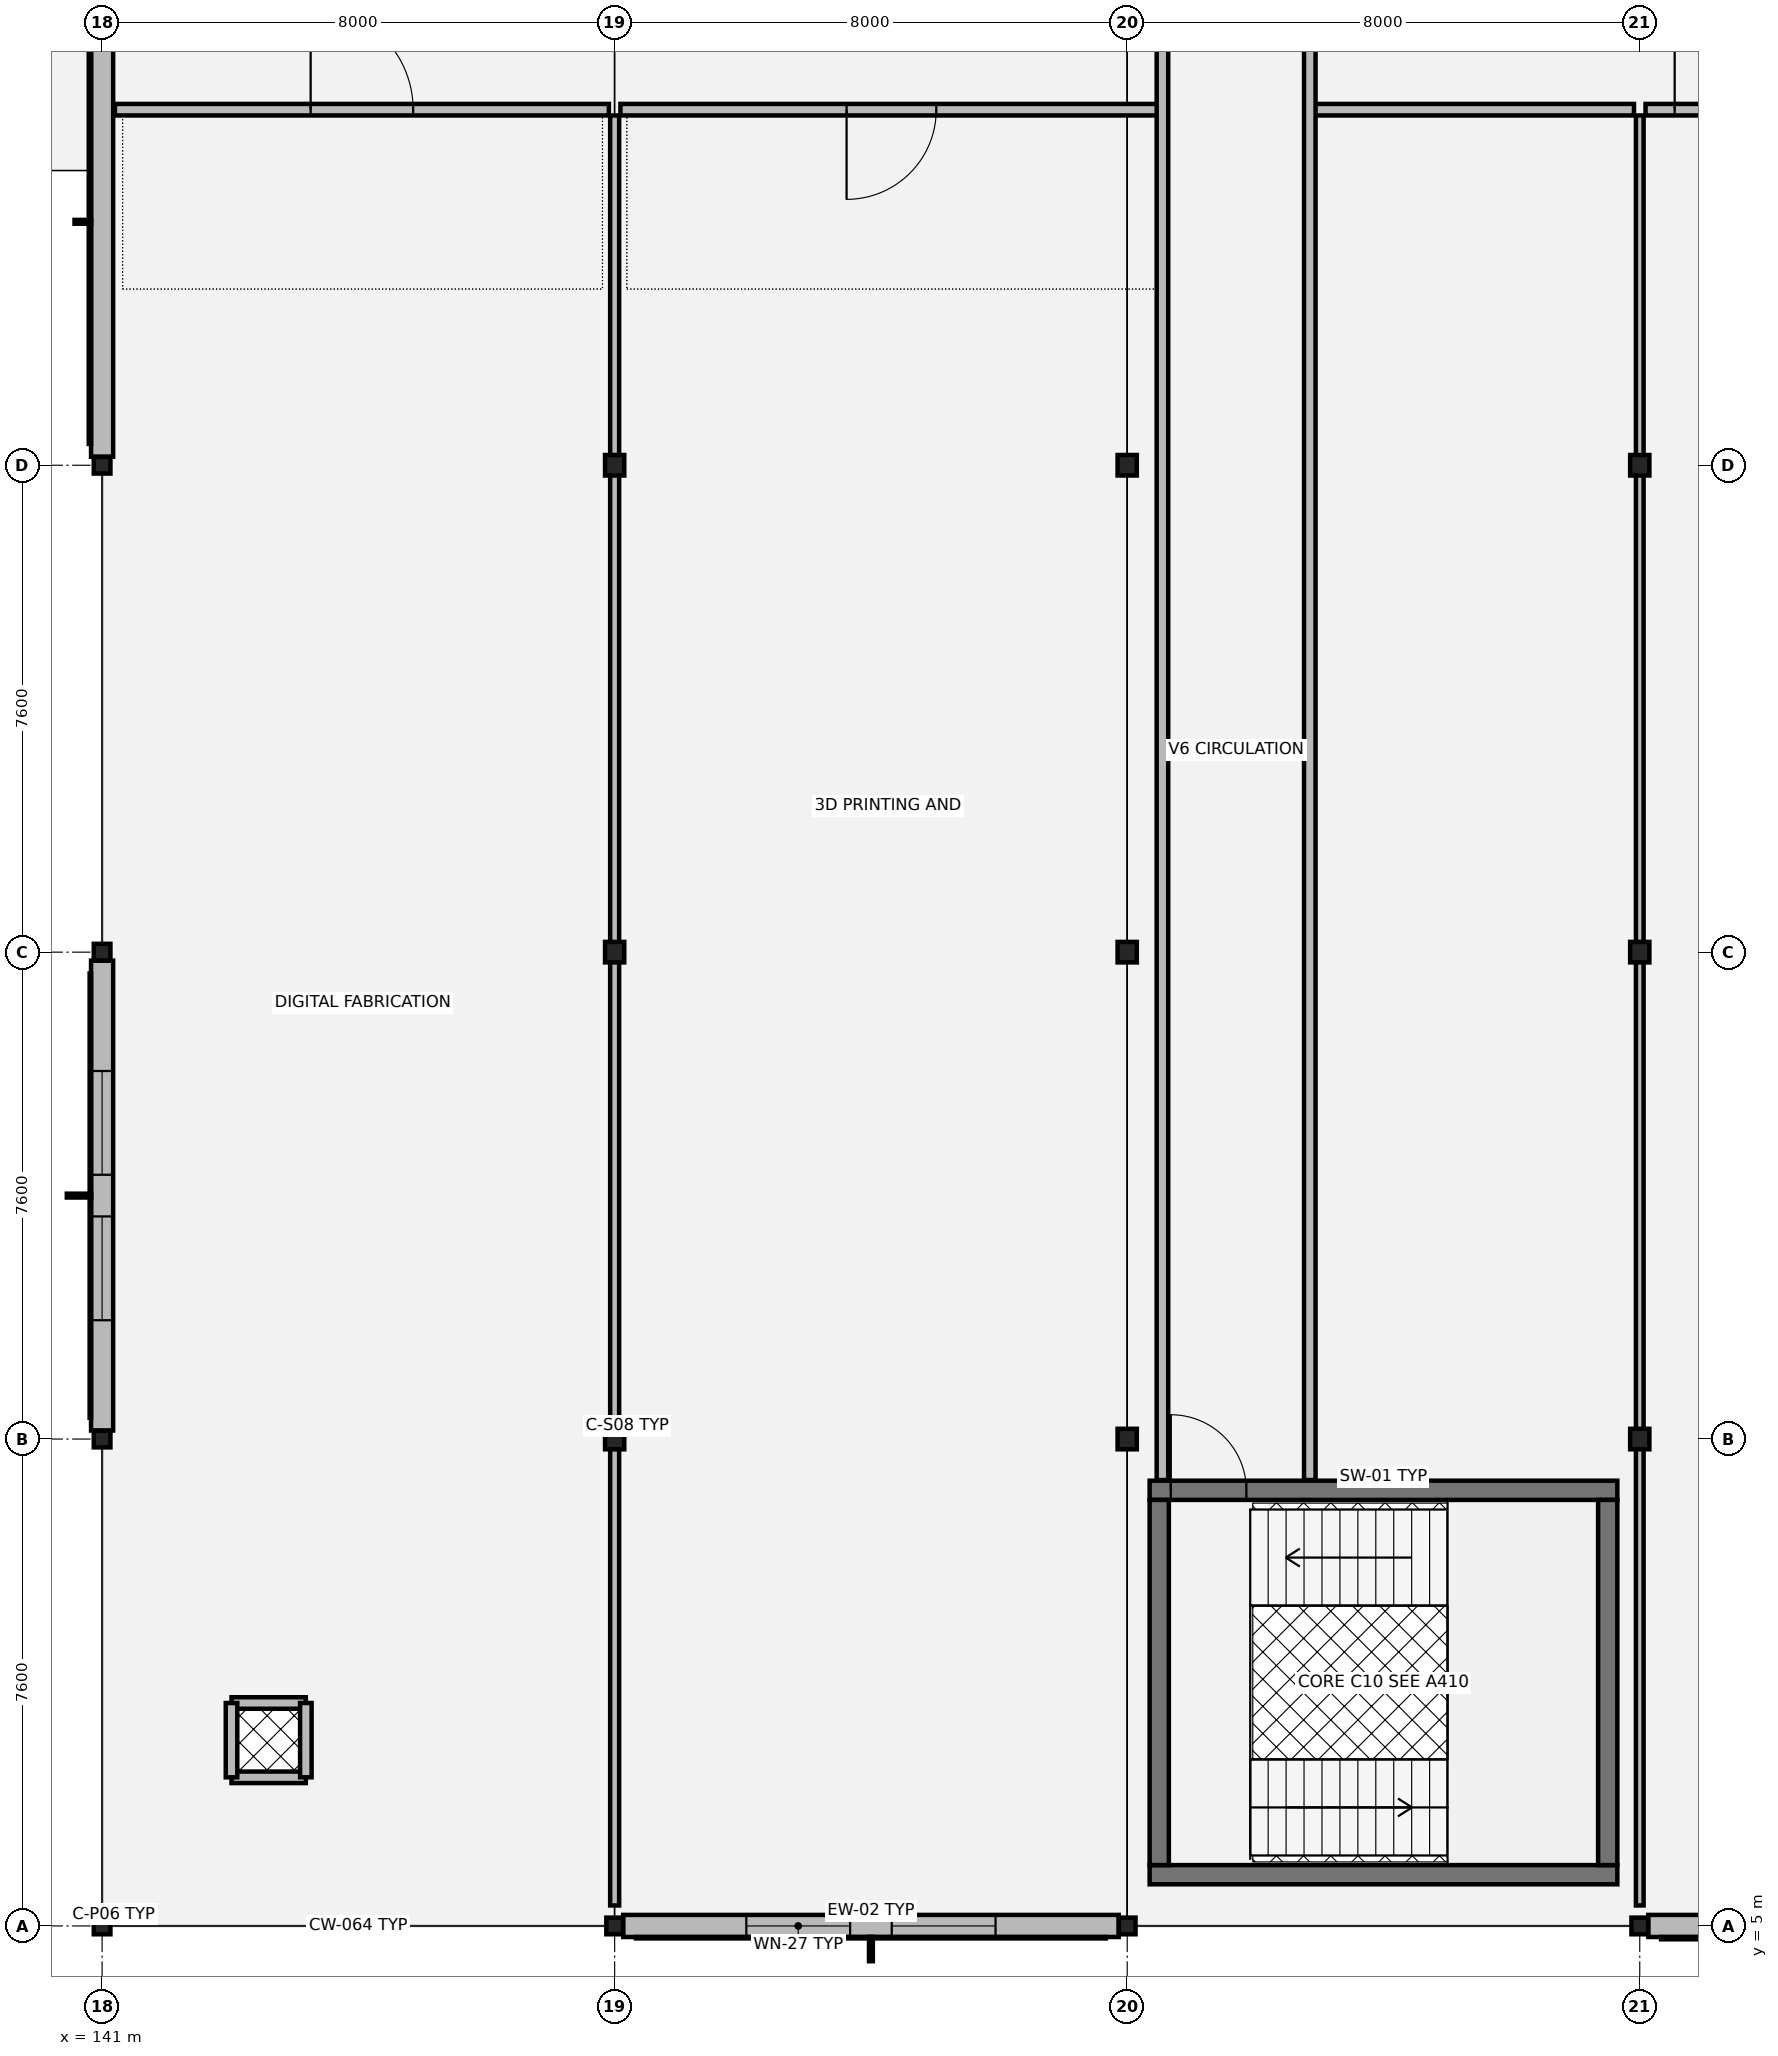
"""IFC4 building model, lengths in metres.
Left out: names, types, materials, properties, quantities, classifications, styles, units other than length and angle.
Written with IfcOpenShell. Run it as: python <this file> out.ifc"""

import sys

from ifc_helpers import new_model, si_unit, direction, frame, frame_2d, origin, origin_2d, place, context, subcontext, project, spatial, rectangle, hollow_rectangle, i_section, extrude, element, fill, save


model = new_model("IFC4")
c1 = context("Model", 3, precision=1e-05, world=origin(), true_north=direction((0.0, 1.0)))
c2 = subcontext(c1, "Body", "Model", "MODEL_VIEW")
j1 = project(units=[si_unit("LENGTHUNIT", "METRE"), si_unit("PLANEANGLEUNIT", "RADIAN")], contexts=[c1])
p1 = place(None, origin())
s1 = spatial("IfcSite", under=j1, at=p1, CompositionType="ELEMENT")
p2 = place(p1, origin())
s2 = spatial("IfcBuilding", under=s1, at=p2, CompositionType="ELEMENT")
p3 = place(p2, frame((0.0, 0.0, 9.18)))
s3 = spatial("IfcBuildingStorey", under=s2, at=p3, CompositionType="ELEMENT", Elevation=9.18)
for number, where, z_axis, x_axis in (
    (1, (141.0, 5.0, 0.0), (0.0, 0.0, 1.0), (1.0, 0.0, 0.0)),
    (2, (141.0, 12.6, 0.0), (0.0, 0.0, 1.0), (1.0, 0.0, 0.0)),
    (3, (141.0, 20.2, 0.0), (0.0, 0.0, 1.0), (1.0, 0.0, 0.0)),
    (4, (141.0, 27.8, 0.0), (0.0, 0.0, 1.0), (1.0, 0.0, 0.0)),
    (5, (149.0, 5.0, 0.0), (0.0, 0.0, 1.0), (1.0, 0.0, 0.0)),
):
    element("IfcColumn", number, at=place(p3, frame(where, z_axis=z_axis, x_axis=x_axis)), inside=s3, PredefinedType="COLUMN", context=c2, shape_type="SweptSolid", body=[
        extrude(hollow_rectangle(XDim=0.26, YDim=0.26, WallThickness=0.012, at=origin_2d()), origin(), (0.0, 0.0, 1.0), 4.055),
    ])
for number, where, z_axis, x_axis in (
    (6, (149.0, 12.6, 0.0), (0.0, 0.0, 1.0), (1.0, 0.0, 0.0)),
    (7, (149.0, 20.2, 0.0), (0.0, 0.0, 1.0), (1.0, 0.0, 0.0)),
    (8, (149.0, 27.8, 0.0), (0.0, 0.0, 1.0), (1.0, 0.0, 0.0)),
):
    element("IfcColumn", number, at=place(p3, frame(where, z_axis=z_axis, x_axis=x_axis)), inside=s3, PredefinedType="COLUMN", context=c2, shape_type="SweptSolid", body=[
        extrude(i_section(OverallWidth=0.3, OverallDepth=0.32, WebThickness=0.011, FlangeThickness=0.021, at=origin_2d()), origin(), (0.0, 0.0, 1.0), 4.055),
    ])
p4 = place(p3, frame((157.0, 5.0, 0.0), z_axis=(0.0, 0.0, 1.0), x_axis=(1.0, 0.0, 0.0)))
e9 = element("IfcColumn", 9, at=p4, inside=s3, PredefinedType="COLUMN", context=c2, shape_type="SweptSolid", body=[
    extrude(hollow_rectangle(XDim=0.26, YDim=0.26, WallThickness=0.012, at=origin_2d()), origin(), (0.0, 0.0, 1.0), 4.055),
])
for number, where, z_axis, x_axis in (
    (10, (157.0, 12.6, 0.0), (0.0, 0.0, 1.0), (1.0, 0.0, 0.0)),
    (11, (157.0, 20.2, 0.0), (0.0, 0.0, 1.0), (1.0, 0.0, 0.0)),
    (12, (157.0, 27.8, 0.0), (0.0, 0.0, 1.0), (1.0, 0.0, 0.0)),
):
    element("IfcColumn", number, at=place(p3, frame(where, z_axis=z_axis, x_axis=x_axis)), inside=s3, PredefinedType="COLUMN", context=c2, shape_type="SweptSolid", body=[
        extrude(i_section(OverallWidth=0.3, OverallDepth=0.32, WebThickness=0.011, FlangeThickness=0.021, at=origin_2d()), origin(), (0.0, 0.0, 1.0), 4.055),
    ])
p5 = place(p3, frame((165.0, 5.0, 0.0), z_axis=(0.0, 0.0, 1.0), x_axis=(1.0, 0.0, 0.0)))
e13 = element("IfcColumn", 13, at=p5, inside=s3, PredefinedType="COLUMN", context=c2, shape_type="SweptSolid", body=[
    extrude(hollow_rectangle(XDim=0.26, YDim=0.26, WallThickness=0.012, at=origin_2d()), origin(), (0.0, 0.0, 1.0), 4.055),
])
for number, where, z_axis, x_axis in (
    (14, (165.0, 12.6, 0.0), (0.0, 0.0, 1.0), (1.0, 0.0, 0.0)),
    (15, (165.0, 20.2, 0.0), (0.0, 0.0, 1.0), (1.0, 0.0, 0.0)),
    (16, (165.0, 27.8, 0.0), (0.0, 0.0, 1.0), (1.0, 0.0, 0.0)),
):
    element("IfcColumn", number, at=place(p3, frame(where, z_axis=z_axis, x_axis=x_axis)), inside=s3, PredefinedType="COLUMN", context=c2, shape_type="SweptSolid", body=[
        extrude(i_section(OverallWidth=0.3, OverallDepth=0.32, WebThickness=0.011, FlangeThickness=0.021, at=origin_2d()), origin(), (0.0, 0.0, 1.0), 4.055),
    ])
p6 = place(p3, frame((149.133, 5.0, 0.0), z_axis=(0.0, 0.0, 1.0), x_axis=(1.0, 0.0, 0.0)))
e17 = element("IfcWall", 17, at=p6, inside=s3, PredefinedType="SOLIDWALL", context=c2, shape_type="SweptSolid", body=[
    extrude(rectangle(XDim=7.734, YDim=0.345, at=frame_2d((3.867, 0.0))), origin(), (0.0, 0.0, 1.0), 3.48),
])
p7 = place(p6, frame((1.922, 0.0, 0.8)))
e18 = element("IfcOpeningElement", 18, at=p7, cuts=e17, PredefinedType="OPENING", context=c2, shape_type="SweptSolid", body=[
    extrude(rectangle(XDim=1.62, YDim=2.06, at=frame_2d((0.81, 1.03))), frame((0.0, 0.182, 0.0), z_axis=(0.0, -1.0, 0.0), x_axis=(1.0, 0.0, 0.0)), (0.0, 0.0, 1.0), 0.365),
])
p8 = place(p6, frame((4.192, 0.0, 0.8)))
e19 = element("IfcOpeningElement", 19, at=p8, cuts=e17, PredefinedType="OPENING", context=c2, shape_type="SweptSolid", body=[
    extrude(rectangle(XDim=1.62, YDim=2.06, at=frame_2d((0.81, 1.03))), frame((0.0, 0.182, 0.0), z_axis=(0.0, -1.0, 0.0), x_axis=(1.0, 0.0, 0.0)), (0.0, 0.0, 1.0), 0.365),
])
p9 = place(p3, frame((165.133, 5.0, 0.0), z_axis=(0.0, 0.0, 1.0), x_axis=(1.0, 0.0, 0.0)))
e20 = element("IfcWall", 20, at=p9, inside=s3, PredefinedType="SOLIDWALL", context=c2, shape_type="SweptSolid", body=[
    extrude(rectangle(XDim=7.734, YDim=0.345, at=frame_2d((3.867, 0.0))), origin(), (0.0, 0.0, 1.0), 3.48),
])
p10 = place(p9, frame((1.842, 0.0, 0.8)))
e21 = element("IfcOpeningElement", 21, at=p10, cuts=e20, PredefinedType="OPENING", context=c2, shape_type="SweptSolid", body=[
    extrude(rectangle(XDim=1.7, YDim=2.2, at=frame_2d((0.85, 1.1))), frame((0.0, 0.182, 0.0), z_axis=(0.0, -1.0, 0.0), x_axis=(1.0, 0.0, 0.0)), (0.0, 0.0, 1.0), 0.365),
])
p11 = place(p9, frame((4.192, 0.0, 0.8)))
e22 = element("IfcOpeningElement", 22, at=p11, cuts=e20, PredefinedType="OPENING", context=c2, shape_type="SweptSolid", body=[
    extrude(rectangle(XDim=1.7, YDim=2.2, at=frame_2d((0.85, 1.1))), frame((0.0, 0.182, 0.0), z_axis=(0.0, -1.0, 0.0), x_axis=(1.0, 0.0, 0.0)), (0.0, 0.0, 1.0), 0.365),
])
p12 = place(p3, frame((141.0, 35.267, 0.0), z_axis=(0.0, 0.0, 1.0), x_axis=(0.0, -1.0, 0.0)))
e23 = element("IfcWall", 23, at=p12, inside=s3, PredefinedType="SOLIDWALL", context=c2, shape_type="SweptSolid", body=[
    extrude(rectangle(XDim=7.334, YDim=0.345, at=frame_2d((3.667, 0.0))), origin(), (0.0, 0.0, 1.0), 3.48),
])
p13 = place(p3, frame((141.0, 20.067, 0.0), z_axis=(0.0, 0.0, 1.0), x_axis=(0.0, -1.0, 0.0)))
e24 = element("IfcWall", 24, at=p13, inside=s3, PredefinedType="SOLIDWALL", context=c2, shape_type="SweptSolid", body=[
    extrude(rectangle(XDim=7.334, YDim=0.345, at=frame_2d((3.667, 0.0))), origin(), (0.0, 0.0, 1.0), 3.48),
])
p14 = place(p13, frame((1.722, 0.0, 0.8)))
e25 = element("IfcOpeningElement", 25, at=p14, cuts=e24, PredefinedType="OPENING", context=c2, shape_type="SweptSolid", body=[
    extrude(rectangle(XDim=1.62, YDim=2.06, at=frame_2d((0.81, 1.03))), frame((0.0, 0.182, 0.0), z_axis=(0.0, -1.0, 0.0), x_axis=(1.0, 0.0, 0.0)), (0.0, 0.0, 1.0), 0.365),
])
p15 = place(p13, frame((3.992, 0.0, 0.8)))
e26 = element("IfcOpeningElement", 26, at=p15, cuts=e24, PredefinedType="OPENING", context=c2, shape_type="SweptSolid", body=[
    extrude(rectangle(XDim=1.62, YDim=2.06, at=frame_2d((0.81, 1.03))), frame((0.0, 0.182, 0.0), z_axis=(0.0, -1.0, 0.0), x_axis=(1.0, 0.0, 0.0)), (0.0, 0.0, 1.0), 0.365),
])
p16 = place(p3, frame((157.35, 5.8, 0.0), z_axis=(0.0, 0.0, 1.0), x_axis=(1.0, 0.0, 0.0)))
e27 = element("IfcWall", 27, at=p16, inside=s3, PredefinedType="SHEAR", context=c2, shape_type="SweptSolid", body=[
    extrude(rectangle(XDim=7.3, YDim=0.3, at=frame_2d((3.65, 0.0))), origin(), (0.0, 0.0, 1.0), 3.845),
])
p17 = place(p3, frame((157.35, 11.8, 0.0), z_axis=(0.0, 0.0, 1.0), x_axis=(1.0, 0.0, 0.0)))
e28 = element("IfcWall", 28, at=p17, inside=s3, PredefinedType="SHEAR", context=c2, shape_type="SweptSolid", body=[
    extrude(rectangle(XDim=7.3, YDim=0.3, at=frame_2d((3.65, 0.0))), origin(), (0.0, 0.0, 1.0), 3.845),
])
p18 = place(p17, frame((0.33, 0.0, 0.0)))
e29 = element("IfcOpeningElement", 29, at=p18, cuts=e28, PredefinedType="OPENING", context=c2, shape_type="SweptSolid", body=[
    extrude(rectangle(XDim=1.18, YDim=2.18, at=frame_2d((0.59, 1.09))), frame((0.0, 0.16, 0.0), z_axis=(0.0, -1.0, 0.0), x_axis=(1.0, 0.0, 0.0)), (0.0, 0.0, 1.0), 0.32),
])
for number, where, z_axis, x_axis in (
    (30, (157.5, 5.95, 0.0), (0.0, 0.0, 1.0), (0.0, 1.0, 0.0)),
    (31, (164.5, 5.95, 0.0), (0.0, 0.0, 1.0), (0.0, 1.0, 0.0)),
):
    element("IfcWall", number, at=place(p3, frame(where, z_axis=z_axis, x_axis=x_axis)), inside=s3, PredefinedType="SHEAR", context=c2, shape_type="SweptSolid", body=[
        extrude(rectangle(XDim=5.7, YDim=0.3, at=frame_2d((2.85, 0.0))), origin(), (0.0, 0.0, 1.0), 3.845),
    ])
for number, where, z_axis, x_axis in (
    (32, (143.02, 7.32, 0.0), (0.0, 0.0, 1.0), (1.0, 0.0, 0.0)),
    (33, (144.18, 8.48, 0.0), (0.0, 0.0, 1.0), (-1.0, 0.0, 0.0)),
    (34, (143.02, 8.48, 0.0), (0.0, 0.0, 1.0), (0.0, -1.0, 0.0)),
    (35, (144.18, 7.32, 0.0), (0.0, 0.0, 1.0), (0.0, 1.0, 0.0)),
):
    element("IfcWall", number, at=place(p3, frame(where, z_axis=z_axis, x_axis=x_axis)), inside=s3, PredefinedType="PARTITIONING", context=c2, shape_type="SweptSolid", body=[
        extrude(rectangle(XDim=1.16, YDim=0.18, at=frame_2d((0.58, 0.0))), origin(), (0.0, 0.0, 1.0), 3.18),
    ])
p19 = place(p3, frame((141.2, 33.35, 0.0), z_axis=(0.0, 0.0, 1.0), x_axis=(1.0, 0.0, 0.0)))
e36 = element("IfcWall", 36, at=p19, inside=s3, PredefinedType="PARTITIONING", context=c2, shape_type="SweptSolid", body=[
    extrude(rectangle(XDim=7.71, YDim=0.18, at=frame_2d((3.855, 0.0))), origin(), (0.0, 0.0, 1.0), 3.18),
])
p20 = place(p19, frame((3.055, 0.0, 0.0)))
e37 = element("IfcOpeningElement", 37, at=p20, cuts=e36, PredefinedType="OPENING", context=c2, shape_type="SweptSolid", body=[
    extrude(rectangle(XDim=1.6, YDim=2.25, at=frame_2d((0.8, 1.125))), frame((0.0, 0.1, 0.0), z_axis=(0.0, -1.0, 0.0), x_axis=(1.0, 0.0, 0.0)), (0.0, 0.0, 1.0), 0.2),
])
p21 = place(p3, frame((149.09, 33.35, 0.0), z_axis=(0.0, 0.0, 1.0), x_axis=(1.0, 0.0, 0.0)))
e38 = element("IfcWall", 38, at=p21, inside=s3, PredefinedType="PARTITIONING", context=c2, shape_type="SweptSolid", body=[
    extrude(rectangle(XDim=8.46, YDim=0.18, at=frame_2d((4.23, 0.0))), origin(), (0.0, 0.0, 1.0), 3.18),
])
p22 = place(p21, frame((3.53, 0.0, 0.0)))
e39 = element("IfcOpeningElement", 39, at=p22, cuts=e38, PredefinedType="OPENING", context=c2, shape_type="SweptSolid", body=[
    extrude(rectangle(XDim=1.4, YDim=2.22, at=frame_2d((0.7, 1.11))), frame((0.0, 0.1, 0.0), z_axis=(0.0, -1.0, 0.0), x_axis=(1.0, 0.0, 0.0)), (0.0, 0.0, 1.0), 0.2),
])
p23 = place(p3, frame((159.85, 33.35, 0.0), z_axis=(0.0, 0.0, 1.0), x_axis=(1.0, 0.0, 0.0)))
e40 = element("IfcWall", 40, at=p23, inside=s3, PredefinedType="PARTITIONING", context=c2, shape_type="SweptSolid", body=[
    extrude(rectangle(XDim=5.06, YDim=0.18, at=frame_2d((2.53, 0.0))), origin(), (0.0, 0.0, 1.0), 3.18),
])
p24 = place(p3, frame((165.09, 33.35, 0.0), z_axis=(0.0, 0.0, 1.0), x_axis=(1.0, 0.0, 0.0)))
e41 = element("IfcWall", 41, at=p24, inside=s3, PredefinedType="PARTITIONING", context=c2, shape_type="SweptSolid", body=[
    extrude(rectangle(XDim=2.17, YDim=0.18, at=frame_2d((1.085, 0.0))), origin(), (0.0, 0.0, 1.0), 3.18),
])
p25 = place(p24, frame((0.455, 0.0, 0.0)))
e42 = element("IfcOpeningElement", 42, at=p25, cuts=e41, PredefinedType="OPENING", context=c2, shape_type="SweptSolid", body=[
    extrude(rectangle(XDim=1.26, YDim=2.2, at=frame_2d((0.63, 1.1))), frame((0.0, 0.1, 0.0), z_axis=(0.0, -1.0, 0.0), x_axis=(1.0, 0.0, 0.0)), (0.0, 0.0, 1.0), 0.2),
])
for number, where, z_axis, x_axis in (
    (43, (157.55, 11.96, 0.0), (0.0, 0.0, 1.0), (0.0, 1.0, 0.0)),
    (44, (159.85, 11.96, 0.0), (0.0, 0.0, 1.0), (0.0, 1.0, 0.0)),
):
    element("IfcWall", number, at=place(p3, frame(where, z_axis=z_axis, x_axis=x_axis)), inside=s3, PredefinedType="PARTITIONING", context=c2, shape_type="SweptSolid", body=[
        extrude(rectangle(XDim=24.08, YDim=0.18, at=frame_2d((12.04, 0.0))), origin(), (0.0, 0.0, 1.0), 3.18),
    ])
p26 = place(p3, frame((149.0, 5.32, 0.0), z_axis=(0.0, 0.0, 1.0), x_axis=(0.0, 1.0, 0.0)))
e45 = element("IfcWall", 45, at=p26, inside=s3, PredefinedType="PARTITIONING", context=c2, shape_type="SweptSolid", body=[
    extrude(rectangle(XDim=27.94, YDim=0.14, at=frame_2d((13.97, 0.0))), origin(), (0.0, 0.0, 1.0), 3.18),
])
p27 = place(p3, frame((165.0, 5.32, 0.0), z_axis=(0.0, 0.0, 1.0), x_axis=(0.0, 1.0, 0.0)))
e46 = element("IfcWall", 46, at=p27, inside=s3, PredefinedType="PARTITIONING", context=c2, shape_type="SweptSolid", body=[
    extrude(rectangle(XDim=27.94, YDim=0.12, at=frame_2d((13.97, 0.0))), origin(), (0.0, 0.0, 1.0), 3.18),
])
p28 = place(p7, origin())
e47 = element("IfcWindow", 47, at=p28, inside=s3, PartitioningType="SINGLE_PANEL", PredefinedType="WINDOW", context=c2, shape_type="SweptSolid", body=[
    extrude(rectangle(XDim=1.62, YDim=2.06, at=frame_2d((0.81, 1.03))), frame((0.0, 0.03, 0.0), z_axis=(0.0, -1.0, 0.0), x_axis=(1.0, 0.0, 0.0)), (0.0, 0.0, 1.0), 0.06),
])
fill(e18, e47)
p29 = place(p8, origin())
e48 = element("IfcWindow", 48, at=p29, inside=s3, PartitioningType="SINGLE_PANEL", PredefinedType="WINDOW", context=c2, shape_type="SweptSolid", body=[
    extrude(rectangle(XDim=1.62, YDim=2.06, at=frame_2d((0.81, 1.03))), frame((0.0, 0.03, 0.0), z_axis=(0.0, -1.0, 0.0), x_axis=(1.0, 0.0, 0.0)), (0.0, 0.0, 1.0), 0.06),
])
fill(e19, e48)
p30 = place(p14, origin())
e49 = element("IfcWindow", 49, at=p30, inside=s3, PartitioningType="SINGLE_PANEL", PredefinedType="WINDOW", context=c2, shape_type="SweptSolid", body=[
    extrude(rectangle(XDim=1.62, YDim=2.06, at=frame_2d((0.81, 1.03))), frame((0.0, 0.03, 0.0), z_axis=(0.0, -1.0, 0.0), x_axis=(1.0, 0.0, 0.0)), (0.0, 0.0, 1.0), 0.06),
])
fill(e25, e49)
p31 = place(p15, origin())
e50 = element("IfcWindow", 50, at=p31, inside=s3, PartitioningType="SINGLE_PANEL", PredefinedType="WINDOW", context=c2, shape_type="SweptSolid", body=[
    extrude(rectangle(XDim=1.62, YDim=2.06, at=frame_2d((0.81, 1.03))), frame((0.0, 0.03, 0.0), z_axis=(0.0, -1.0, 0.0), x_axis=(1.0, 0.0, 0.0)), (0.0, 0.0, 1.0), 0.06),
])
fill(e26, e50)
p32 = place(p18, origin())
e51 = element("IfcDoor", 51, at=p32, inside=s3, OperationType="SINGLE_SWING_LEFT", PredefinedType="DOOR", context=c2, shape_type="SweptSolid", body=[
    extrude(rectangle(XDim=1.18, YDim=2.18, at=frame_2d((0.59, 1.09))), frame((0.0, 0.025, 0.0), z_axis=(0.0, -1.0, 0.0), x_axis=(1.0, 0.0, 0.0)), (0.0, 0.0, 1.0), 0.05),
])
fill(e29, e51)
p33 = place(p20, origin())
e52 = element("IfcDoor", 52, at=p33, inside=s3, OperationType="DOUBLE_DOOR_SINGLE_SWING", PredefinedType="DOOR", context=c2, shape_type="SweptSolid", body=[
    extrude(rectangle(XDim=1.6, YDim=2.25, at=frame_2d((0.8, 1.125))), frame((0.0, 0.025, 0.0), z_axis=(0.0, -1.0, 0.0), x_axis=(1.0, 0.0, 0.0)), (0.0, 0.0, 1.0), 0.05),
])
fill(e37, e52)
p34 = place(p22, origin())
e53 = element("IfcDoor", 53, at=p34, inside=s3, OperationType="SINGLE_SWING_RIGHT", PredefinedType="DOOR", context=c2, shape_type="SweptSolid", body=[
    extrude(rectangle(XDim=1.4, YDim=2.22, at=frame_2d((0.7, 1.11))), frame((0.0, 0.025, 0.0), z_axis=(0.0, -1.0, 0.0), x_axis=(1.0, 0.0, 0.0)), (0.0, 0.0, 1.0), 0.05),
])
fill(e39, e53)
p35 = place(p25, origin())
e54 = element("IfcDoor", 54, at=p35, inside=s3, OperationType="SINGLE_SWING_LEFT", PredefinedType="DOOR", context=c2, shape_type="SweptSolid", body=[
    extrude(rectangle(XDim=1.26, YDim=2.2, at=frame_2d((0.63, 1.1))), frame((0.0, 0.025, 0.0), z_axis=(0.0, -1.0, 0.0), x_axis=(1.0, 0.0, 0.0)), (0.0, 0.0, 1.0), 0.05),
])
fill(e42, e54)
save(model, sys.argv[1])
